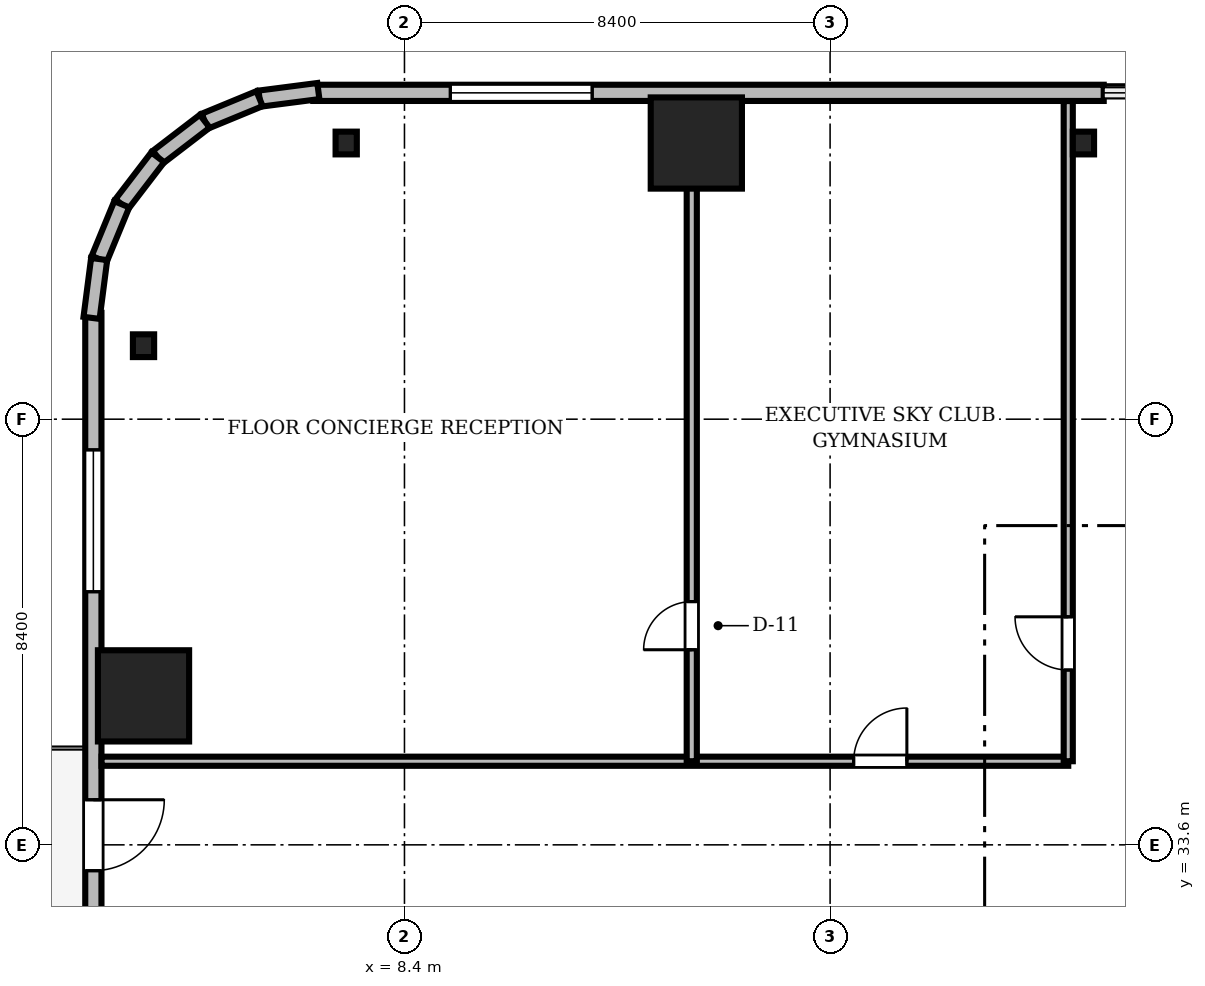
"""IFC4 building model, lengths in metres.
Left out: names, types, materials, properties, quantities, classifications, styles, units other than length and angle.
Written with IfcOpenShell. Run it as: python <this file> out.ifc"""

import sys

from ifc_helpers import new_model, si_unit, direction, frame, frame_2d, origin, origin_2d, place, context, subcontext, project, spatial, rectangle, i_section, extrude, source, transform, mapped, element, fill, save


model = new_model("IFC4")
c1 = context("Model", 3, precision=1e-05, world=origin(), true_north=direction((0.0, 1.0)))
c2 = subcontext(c1, "Body", "Model", "MODEL_VIEW")
j1 = project(units=[si_unit("LENGTHUNIT", "METRE"), si_unit("PLANEANGLEUNIT", "RADIAN")], contexts=[c1])
p1 = place(None, origin())
s1 = spatial("IfcSite", under=j1, at=p1, CompositionType="ELEMENT")
p2 = place(p1, origin())
s2 = spatial("IfcBuilding", under=s1, at=p2, CompositionType="ELEMENT")
p3 = place(p2, frame((0.0, 0.0, 86.0)))
s3 = spatial("IfcBuildingStorey", under=s2, at=p3, CompositionType="ELEMENT", Elevation=86.0)
m1 = source(origin(), c2, "Body", "SweptSolid", [
    extrude(rectangle(XDim=1.8, YDim=1.8, at=origin_2d()), origin(), (0.0, 0.0, 1.0), 3.41),
])
for number, where, z_axis, x_axis in (
    (1, (14.16, 47.45, 0.0), (0.0, 0.0, 1.0), (1.0, 0.0, 0.0)),
    (2, (3.25, 36.54, 0.0), (0.0, 0.0, 1.0), (1.0, 0.0, 0.0)),
):
    element("IfcColumn", number, at=place(p3, frame(where, z_axis=z_axis, x_axis=x_axis)), inside=s3, PredefinedType="COLUMN", context=c2, shape_type="MappedRepresentation", body=[
        mapped(m1, transform((0.0, 0.0, 0.0), scale=1.0)),
    ])
m2 = source(origin(), c2, "Body", "SweptSolid", [
    extrude(i_section(OverallWidth=0.419, OverallDepth=0.449, WebThickness=0.031, FlangeThickness=0.048, FilletRadius=0.015, at=origin_2d()), origin(), (0.0, 0.0, 1.0), 3.41),
])
for number, where, z_axis, x_axis in (
    (3, (21.8, 47.45, 0.0), (0.0, 0.0, 1.0), (1.0, 0.0, 0.0)),
    (4, (7.25, 47.45, 0.0), (0.0, 0.0, 1.0), (1.0, 0.0, 0.0)),
    (5, (3.25, 43.45, 0.0), (0.0, 0.0, 1.0), (1.0, 0.0, 0.0)),
):
    element("IfcColumn", number, at=place(p3, frame(where, z_axis=z_axis, x_axis=x_axis)), inside=s3, PredefinedType="COLUMN", context=c2, shape_type="MappedRepresentation", body=[
        mapped(m2, transform((0.0, 0.0, 0.0), scale=1.0)),
    ])
m3 = source(origin(), c2, "Body", "SweptSolid", [
    extrude(rectangle(XDim=15.6, YDim=0.32, at=frame_2d((7.8, 0.0))), origin(), (0.0, 0.0, 1.0), 3.41),
])
p4 = place(p3, frame((22.2, 48.44, 0.0), z_axis=(0.0, 0.0, 1.0), x_axis=(-1.0, 0.0, 0.0)))
e6 = element("IfcWall", 6, at=p4, inside=s3, PredefinedType="SOLIDWALL", context=c2, shape_type="MappedRepresentation", body=[
    mapped(m3, transform((0.0, 0.0, 0.0), scale=1.0)),
])
m4 = source(origin(), c2, "Body", "SweptSolid", [
    extrude(rectangle(XDim=2.8, YDim=2.4, at=frame_2d((1.4, 1.2))), frame((0.0, 0.17, 0.0), z_axis=(0.0, -1.0, 0.0), x_axis=(1.0, 0.0, 0.0)), (0.0, 0.0, 1.0), 0.34),
])
p5 = place(p4, frame((10.095, 0.0, 0.72)))
e7 = element("IfcOpeningElement", 7, at=p5, cuts=e6, PredefinedType="OPENING", context=c2, shape_type="MappedRepresentation", body=[
    mapped(m4, transform((0.0, 0.0, 0.0), scale=1.0)),
])
m5 = source(origin(), c2, "Body", "SweptSolid", [
    extrude(rectangle(XDim=15.6, YDim=0.32, at=frame_2d((7.8, 0.0))), origin(), (0.0, 0.0, 1.0), 3.41),
])
p6 = place(p3, frame((2.26, 44.1, 0.0), z_axis=(0.0, 0.0, 1.0), x_axis=(0.0, -1.0, 0.0)))
e8 = element("IfcWall", 8, at=p6, inside=s3, PredefinedType="SOLIDWALL", context=c2, shape_type="MappedRepresentation", body=[
    mapped(m5, transform((0.0, 0.0, 0.0), scale=1.0)),
])
m6 = source(origin(), c2, "Body", "SweptSolid", [
    extrude(rectangle(XDim=1.4, YDim=2.3, at=frame_2d((0.7, 1.15))), frame((0.0, 0.17, 0.0), z_axis=(0.0, -1.0, 0.0), x_axis=(1.0, 0.0, 0.0)), (0.0, 0.0, 1.0), 0.34),
])
p7 = place(p6, frame((9.61, 0.0, 0.0)))
e9 = element("IfcOpeningElement", 9, at=p7, cuts=e8, PredefinedType="OPENING", context=c2, shape_type="MappedRepresentation", body=[
    mapped(m6, transform((0.0, 0.0, 0.0), scale=1.0)),
])
p8 = place(p6, frame((2.705, 0.0, 0.72)))
e10 = element("IfcOpeningElement", 10, at=p8, cuts=e8, PredefinedType="OPENING", context=c2, shape_type="MappedRepresentation", body=[
    mapped(m4, transform((0.0, 0.0, 0.0), scale=1.0)),
])
m7 = source(origin(), c2, "Body", "SweptSolid", [
    extrude(rectangle(XDim=1.17, YDim=0.32, at=frame_2d((0.585, 0.0))), origin(), (0.0, 0.0, 1.0), 3.41),
])
p9 = place(p3, frame((6.7, 48.476, 0.0), z_axis=(0.0, 0.0, 1.0), x_axis=(-0.991735963317, -0.128295670475, 0.0)))
e11 = element("IfcWall", 11, at=p9, inside=s3, PredefinedType="SOLIDWALL", context=c2, shape_type="MappedRepresentation", body=[
    mapped(m7, transform((0.0, 0.0, 0.0), scale=1.0)),
])
m8 = source(origin(), c2, "Body", "SweptSolid", [
    extrude(rectangle(XDim=1.169, YDim=0.32, at=frame_2d((0.584, 0.0))), origin(), (0.0, 0.0, 1.0), 3.41),
])
p10 = place(p3, frame((5.54, 48.325, 0.0), z_axis=(0.0, 0.0, 1.0), x_axis=(-0.924552646638, -0.381054331552, 0.0)))
e12 = element("IfcWall", 12, at=p10, inside=s3, PredefinedType="SOLIDWALL", context=c2, shape_type="MappedRepresentation", body=[
    mapped(m8, transform((0.0, 0.0, 0.0), scale=1.0)),
])
m9 = source(origin(), c2, "Body", "SweptSolid", [
    extrude(rectangle(XDim=1.169, YDim=0.32, at=frame_2d((0.584, 0.0))), origin(), (0.0, 0.0, 1.0), 3.41),
])
p11 = place(p3, frame((4.459, 47.88, 0.0), z_axis=(0.0, 0.0, 1.0), x_axis=(-0.793663520347, -0.608356981114, 0.0)))
e13 = element("IfcWall", 13, at=p11, inside=s3, PredefinedType="SOLIDWALL", context=c2, shape_type="MappedRepresentation", body=[
    mapped(m9, transform((0.0, 0.0, 0.0), scale=1.0)),
])
m10 = source(origin(), c2, "Body", "SweptSolid", [
    extrude(rectangle(XDim=1.169, YDim=0.32, at=frame_2d((0.584, 0.0))), origin(), (0.0, 0.0, 1.0), 3.41),
])
p12 = place(p3, frame((3.531, 47.169, 0.0), z_axis=(0.0, 0.0, 1.0), x_axis=(-0.608387696831, -0.793639975269, 0.0)))
e14 = element("IfcWall", 14, at=p12, inside=s3, PredefinedType="SOLIDWALL", context=c2, shape_type="MappedRepresentation", body=[
    mapped(m10, transform((0.0, 0.0, 0.0), scale=1.0)),
])
p13 = place(p3, frame((2.82, 46.241, 0.0), z_axis=(0.0, 0.0, 1.0), x_axis=(-0.381054331552, -0.924552646638, 0.0)))
e15 = element("IfcWall", 15, at=p13, inside=s3, PredefinedType="SOLIDWALL", context=c2, shape_type="MappedRepresentation", body=[
    mapped(m8, transform((0.0, 0.0, 0.0), scale=1.0)),
])
p14 = place(p3, frame((2.375, 45.16, 0.0), z_axis=(0.0, 0.0, 1.0), x_axis=(-0.128295670475, -0.991735963317, 0.0)))
e16 = element("IfcWall", 16, at=p14, inside=s3, PredefinedType="SOLIDWALL", context=c2, shape_type="MappedRepresentation", body=[
    mapped(m7, transform((0.0, 0.0, 0.0), scale=1.0)),
])
m11 = source(origin(), c2, "Body", "SweptSolid", [
    extrude(rectangle(XDim=19.078, YDim=0.18, at=frame_2d((9.539, 0.0))), origin(), (0.0, 0.0, 1.0), 2.652),
])
p15 = place(p3, frame((2.422, 35.25, 0.0), z_axis=(0.0, 0.0, 1.0), x_axis=(1.0, 0.0, 0.0)))
e17 = element("IfcWall", 17, at=p15, inside=s3, PredefinedType="PARTITIONING", context=c2, shape_type="MappedRepresentation", body=[
    mapped(m11, transform((0.0, 0.0, 0.0), scale=1.0)),
])
m12 = source(origin(), c2, "Body", "SweptSolid", [
    extrude(rectangle(XDim=1.05, YDim=2.2, at=frame_2d((0.525, 1.1))), frame((0.0, 0.1, 0.0), z_axis=(0.0, -1.0, 0.0), x_axis=(1.0, 0.0, 0.0)), (0.0, 0.0, 1.0), 0.2),
])
p16 = place(p15, frame((14.843, 0.0, 0.0)))
e18 = element("IfcOpeningElement", 18, at=p16, cuts=e17, PredefinedType="OPENING", context=c2, shape_type="MappedRepresentation", body=[
    mapped(m12, transform((0.0, 0.0, 0.0), scale=1.0)),
])
m13 = source(origin(), c2, "Body", "SweptSolid", [
    extrude(rectangle(XDim=13.028, YDim=0.2, at=frame_2d((6.514, 0.0))), origin(), (0.0, 0.0, 1.0), 2.652),
])
p17 = place(p3, frame((14.07, 35.25, 0.0), z_axis=(0.0, 0.0, 1.0), x_axis=(0.0, 1.0, 0.0)))
e19 = element("IfcWall", 19, at=p17, inside=s3, PredefinedType="PARTITIONING", context=c2, shape_type="MappedRepresentation", body=[
    mapped(m13, transform((0.0, 0.0, 0.0), scale=1.0)),
])
m14 = source(origin(), c2, "Body", "SweptSolid", [
    extrude(rectangle(XDim=0.95, YDim=2.15, at=frame_2d((0.475, 1.075))), frame((0.0, 0.11, 0.0), z_axis=(0.0, -1.0, 0.0), x_axis=(1.0, 0.0, 0.0)), (0.0, 0.0, 1.0), 0.22),
])
p18 = place(p17, frame((2.2, 0.0, 0.0)))
e20 = element("IfcOpeningElement", 20, at=p18, cuts=e19, PredefinedType="OPENING", context=c2, shape_type="MappedRepresentation", body=[
    mapped(m14, transform((0.0, 0.0, 0.0), scale=1.0)),
])
m15 = source(origin(), c2, "Body", "SweptSolid", [
    extrude(rectangle(XDim=13.028, YDim=0.18, at=frame_2d((6.514, 0.0))), origin(), (0.0, 0.0, 1.0), 2.652),
])
p19 = place(p3, frame((21.5, 35.25, 0.0), z_axis=(0.0, 0.0, 1.0), x_axis=(0.0, 1.0, 0.0)))
e21 = element("IfcWall", 21, at=p19, inside=s3, PredefinedType="PARTITIONING", context=c2, shape_type="MappedRepresentation", body=[
    mapped(m15, transform((0.0, 0.0, 0.0), scale=1.0)),
])
p20 = place(p19, frame((1.8, 0.0, 0.0)))
e22 = element("IfcOpeningElement", 22, at=p20, cuts=e21, PredefinedType="OPENING", context=c2, shape_type="MappedRepresentation", body=[
    mapped(m12, transform((0.0, 0.0, 0.0), scale=1.0)),
])
m16 = source(origin(), c2, "Body", "SweptSolid", [
    extrude(rectangle(XDim=2.8, YDim=2.4, at=frame_2d((1.4, 1.2))), frame((0.0, 0.03, 0.0), z_axis=(0.0, -1.0, 0.0), x_axis=(1.0, 0.0, 0.0)), (0.0, 0.0, 1.0), 0.06),
])
p21 = place(p5, origin())
e23 = element("IfcWindow", 23, at=p21, inside=s3, PartitioningType="SINGLE_PANEL", PredefinedType="WINDOW", context=c2, shape_type="MappedRepresentation", body=[
    mapped(m16, transform((0.0, 0.0, 0.0), scale=1.0)),
])
fill(e7, e23)
m17 = source(origin(), c2, "Body", "SweptSolid", [
    extrude(rectangle(XDim=1.4, YDim=2.3, at=frame_2d((0.7, 1.15))), frame((0.0, 0.025, 0.0), z_axis=(0.0, -1.0, 0.0), x_axis=(1.0, 0.0, 0.0)), (0.0, 0.0, 1.0), 0.05),
])
p22 = place(p7, frame((1.4, 0.0, 0.0), z_axis=(0.0, 0.0, 1.0), x_axis=(-1.0, 0.0, 0.0)))
e24 = element("IfcDoor", 24, at=p22, inside=s3, OperationType="DOUBLE_DOOR_SLIDING", PredefinedType="DOOR", context=c2, shape_type="MappedRepresentation", body=[
    mapped(m17, transform((0.0, 0.0, 0.0), scale=1.0)),
])
fill(e9, e24)
p23 = place(p8, origin())
e25 = element("IfcWindow", 25, at=p23, inside=s3, PartitioningType="SINGLE_PANEL", PredefinedType="WINDOW", context=c2, shape_type="MappedRepresentation", body=[
    mapped(m16, transform((0.0, 0.0, 0.0), scale=1.0)),
])
fill(e10, e25)
m18 = source(origin(), c2, "Body", "SweptSolid", [
    extrude(rectangle(XDim=1.05, YDim=2.2, at=frame_2d((0.525, 1.1))), frame((0.0, 0.025, 0.0), z_axis=(0.0, -1.0, 0.0), x_axis=(1.0, 0.0, 0.0)), (0.0, 0.0, 1.0), 0.05),
])
p24 = place(p16, origin())
e26 = element("IfcDoor", 26, at=p24, inside=s3, OperationType="SINGLE_SWING_RIGHT", PredefinedType="DOOR", context=c2, shape_type="MappedRepresentation", body=[
    mapped(m18, transform((0.0, 0.0, 0.0), scale=1.0)),
])
fill(e18, e26)
m19 = source(origin(), c2, "Body", "SweptSolid", [
    extrude(rectangle(XDim=0.95, YDim=2.15, at=frame_2d((0.475, 1.075))), frame((0.0, 0.025, 0.0), z_axis=(0.0, -1.0, 0.0), x_axis=(1.0, 0.0, 0.0)), (0.0, 0.0, 1.0), 0.05),
])
p25 = place(p18, origin())
e27 = element("IfcDoor", 27, at=p25, inside=s3, OperationType="SINGLE_SWING_LEFT", PredefinedType="DOOR", context=c2, shape_type="MappedRepresentation", body=[
    mapped(m19, transform((0.0, 0.0, 0.0), scale=1.0)),
])
fill(e20, e27)
p26 = place(p20, origin())
e28 = element("IfcDoor", 28, at=p26, inside=s3, OperationType="SINGLE_SWING_RIGHT", PredefinedType="DOOR", context=c2, shape_type="MappedRepresentation", body=[
    mapped(m18, transform((0.0, 0.0, 0.0), scale=1.0)),
])
fill(e22, e28)
save(model, sys.argv[1])
